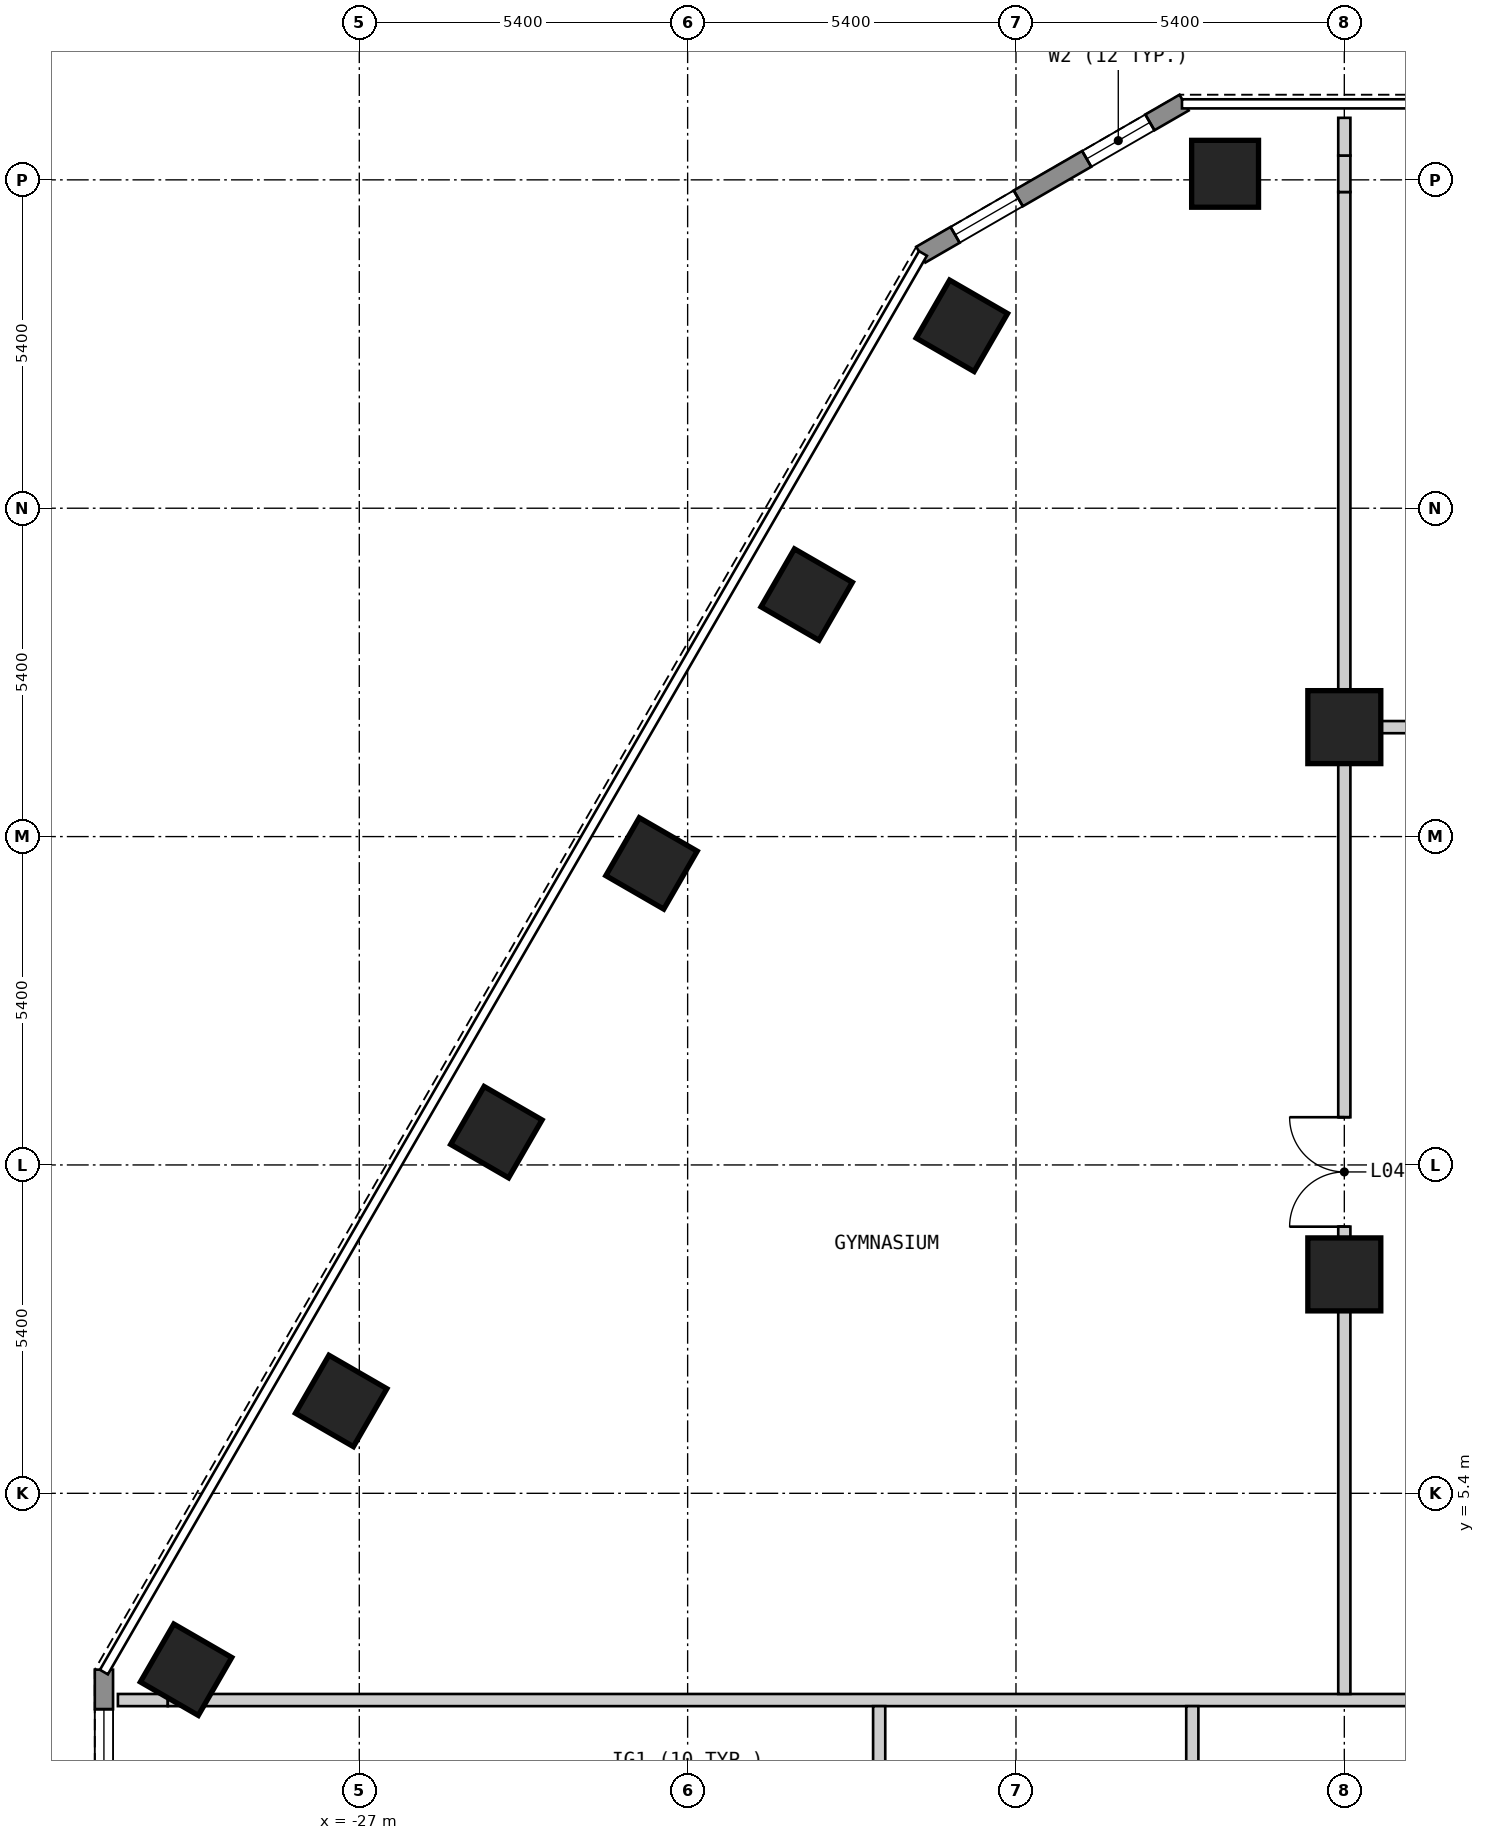
"""IFC4 building model, lengths in metres.
Left out: names, types, materials, properties, quantities, classifications, styles, units other than length and angle.
Written with IfcOpenShell. Run it as: python <this file> out.ifc"""

import sys

from ifc_helpers import new_model, si_unit, direction, frame, frame_2d, origin, origin_2d, place, context, subcontext, project, spatial, polyline, rectangle, outline, extrude, element, fill, save


model = new_model("IFC4")
c1 = context("Model", 3, precision=1e-05, world=origin(), true_north=direction((0.0, 1.0)))
c2 = subcontext(c1, "Body", "Model", "MODEL_VIEW")
j1 = project(units=[si_unit("LENGTHUNIT", "METRE"), si_unit("PLANEANGLEUNIT", "RADIAN")], contexts=[c1])
p1 = place(None, origin())
s1 = spatial("IfcSite", under=j1, at=p1, CompositionType="ELEMENT")
p2 = place(p1, origin())
s2 = spatial("IfcBuilding", under=s1, at=p2, CompositionType="ELEMENT")
p3 = place(p2, frame((0.0, 0.0, 16.2)))
s3 = spatial("IfcBuildingStorey", under=s2, at=p3, CompositionType="ELEMENT", Elevation=16.2)
for number, where, z_axis, x_axis in (
    (1, (-12.761, 27.1, 0.0), (0.0, 0.0, 1.0), (-1.0, 0.0, 0.0)),
    (2, (-17.09, 24.6, 0.0), (0.0, 0.0, 1.0), (-0.5, -0.866, 0.0)),
    (3, (-19.642, 20.18, 0.0), (0.0, 0.0, 1.0), (-0.5, -0.866, 0.0)),
    (4, (-22.194, 15.759, 0.0), (0.0, 0.0, 1.0), (-0.5, -0.866, 0.0)),
    (5, (-24.746, 11.339, 0.0), (0.0, 0.0, 1.0), (-0.5, -0.866, 0.0)),
    (6, (-27.298, 6.919, 0.0), (0.0, 0.0, 1.0), (-0.5, -0.866, 0.0)),
    (7, (-29.849, 2.499, 0.0), (0.0, 0.0, 1.0), (-0.5, -0.866, 0.0)),
):
    element("IfcColumn", number, at=place(p3, frame(where, z_axis=z_axis, x_axis=x_axis)), inside=s3, PredefinedType="COLUMN", context=c2, shape_type="SweptSolid", body=[
        extrude(rectangle(XDim=1.1, YDim=1.1, at=origin_2d()), origin(), (0.0, 0.0, 1.0), 3.6),
    ])
for number, where, z_axis, x_axis in (
    (8, (-10.8, 9.0, 0.0), (0.0, 0.0, 1.0), (1.0, 0.0, 0.0)),
    (9, (-10.8, 18.0, 0.0), (0.0, 0.0, 1.0), (1.0, 0.0, 0.0)),
):
    element("IfcColumn", number, at=place(p3, frame(where, z_axis=z_axis, x_axis=x_axis)), inside=s3, PredefinedType="COLUMN", context=c2, shape_type="SweptSolid", body=[
        extrude(rectangle(XDim=1.2, YDim=1.2, at=origin_2d()), origin(), (0.0, 0.0, 1.0), 3.6),
    ])
p4 = place(p3, frame((-13.435, 28.27, 0.0), z_axis=(0.0, 0.0, 1.0), x_axis=(-0.866010750942, -0.50002537861, 0.0)))
e10 = element("IfcWall", 10, at=p4, inside=s3, PredefinedType="SOLIDWALL", context=c2, shape_type="SweptSolid", body=[
    extrude(outline(polyline([(0.0, -0.15), (5.0, -0.15), (4.919, 0.15), (0.08, 0.15), (0.0, -0.15)])), origin(), (0.0, 0.0, 1.0), 3.25),
])
p5 = place(p4, frame((0.65, 0.0, 0.15)))
e11 = element("IfcOpeningElement", 11, at=p5, cuts=e10, PredefinedType="OPENING", context=c2, shape_type="SweptSolid", body=[
    extrude(rectangle(XDim=1.2, YDim=2.1, at=frame_2d((0.6, 1.05))), frame((0.0, 0.16, 0.0), z_axis=(0.0, -1.0, 0.0), x_axis=(1.0, 0.0, 0.0)), (0.0, 0.0, 1.0), 0.32),
])
p6 = place(p4, frame((3.149, 0.0, 0.15)))
e12 = element("IfcOpeningElement", 12, at=p6, cuts=e10, PredefinedType="OPENING", context=c2, shape_type="SweptSolid", body=[
    extrude(rectangle(XDim=1.2, YDim=2.1, at=frame_2d((0.6, 1.05))), frame((0.0, 0.16, 0.0), z_axis=(0.0, -1.0, 0.0), x_axis=(1.0, 0.0, 0.0)), (0.0, 0.0, 1.0), 0.32),
])
p7 = place(p3, frame((-31.2, 2.5, 0.0), z_axis=(0.0, 0.0, 1.0), x_axis=(0.0, -1.0, 0.0)))
e13 = element("IfcWall", 13, at=p7, inside=s3, PredefinedType="SOLIDWALL", context=c2, shape_type="SweptSolid", body=[
    extrude(outline(polyline([(0.0, -0.15), (5.0, -0.15), (4.92, 0.15), (0.08, 0.15), (0.0, -0.15)])), origin(), (0.0, 0.0, 1.0), 3.25),
])
p8 = place(p7, frame((0.65, 0.0, 0.15)))
e14 = element("IfcOpeningElement", 14, at=p8, cuts=e13, PredefinedType="OPENING", context=c2, shape_type="SweptSolid", body=[
    extrude(rectangle(XDim=1.2, YDim=2.1, at=frame_2d((0.6, 1.05))), frame((0.0, 0.16, 0.0), z_axis=(0.0, -1.0, 0.0), x_axis=(1.0, 0.0, 0.0)), (0.0, 0.0, 1.0), 0.32),
])
p9 = place(p7, frame((3.15, 0.0, 0.15)))
e15 = element("IfcOpeningElement", 15, at=p9, cuts=e13, PredefinedType="OPENING", context=c2, shape_type="SweptSolid", body=[
    extrude(rectangle(XDim=1.2, YDim=2.1, at=frame_2d((0.6, 1.05))), frame((0.0, 0.16, 0.0), z_axis=(0.0, -1.0, 0.0), x_axis=(1.0, 0.0, 0.0)), (0.0, 0.0, 1.0), 0.32),
])
p10 = place(p3, frame((-30.97, 2.0, 0.0), z_axis=(0.0, 0.0, 1.0), x_axis=(1.0, 0.0, 0.0)))
e16 = element("IfcWall", 16, at=p10, inside=s3, PredefinedType="PARTITIONING", context=c2, shape_type="SweptSolid", body=[
    extrude(rectangle(XDim=0.821, YDim=0.2, at=frame_2d((0.411, 0.0))), origin(), (0.0, 0.0, 1.0), 3.25),
])
p11 = place(p3, frame((-30.149, 2.0, 0.0), z_axis=(0.0, 0.0, 1.0), x_axis=(1.0, 0.0, 0.0)))
e17 = element("IfcWall", 17, at=p11, inside=s3, PredefinedType="PARTITIONING", context=c2, shape_type="SweptSolid", body=[
    extrude(rectangle(XDim=0.6, YDim=0.2, at=frame_2d((0.3, 0.0))), origin(), (0.0, 0.0, 1.0), 2.52),
])
p12 = place(p3, frame((-29.549, 2.0, 0.0), z_axis=(0.0, 0.0, 1.0), x_axis=(1.0, 0.0, 0.0)))
e18 = element("IfcWall", 18, at=p12, inside=s3, PredefinedType="PARTITIONING", context=c2, shape_type="SweptSolid", body=[
    extrude(rectangle(XDim=59.097, YDim=0.2, at=frame_2d((29.549, 0.0))), origin(), (0.0, 0.0, 1.0), 3.25),
])
p13 = place(p12, frame((21.517, 0.0, 0.0)))
e19 = element("IfcOpeningElement", 19, at=p13, cuts=e18, PredefinedType="OPENING", context=c2, shape_type="SweptSolid", body=[
    extrude(rectangle(XDim=1.8, YDim=2.1, at=frame_2d((0.9, 1.05))), frame((0.0, 0.11, 0.0), z_axis=(0.0, -1.0, 0.0), x_axis=(1.0, 0.0, 0.0)), (0.0, 0.0, 1.0), 0.22),
])
p14 = place(p12, frame((35.781, 0.0, 0.0)))
e20 = element("IfcOpeningElement", 20, at=p14, cuts=e18, PredefinedType="OPENING", context=c2, shape_type="SweptSolid", body=[
    extrude(rectangle(XDim=1.8, YDim=2.1, at=frame_2d((0.9, 1.05))), frame((0.0, 0.11, 0.0), z_axis=(0.0, -1.0, 0.0), x_axis=(1.0, 0.0, 0.0)), (0.0, 0.0, 1.0), 0.22),
])
p15 = place(p3, frame((-10.7, 18.0, 0.0), z_axis=(0.0, 0.0, 1.0), x_axis=(1.0, 0.0, 0.0)))
e21 = element("IfcWall", 21, at=p15, inside=s3, PredefinedType="PARTITIONING", context=c2, shape_type="SweptSolid", body=[
    extrude(rectangle(XDim=21.4, YDim=0.2, at=frame_2d((10.7, 0.0))), origin(), (0.0, 0.0, 1.0), 3.25),
])
p16 = place(p15, frame((7.87, 0.0, 0.0)))
e22 = element("IfcOpeningElement", 22, at=p16, cuts=e21, PredefinedType="OPENING", context=c2, shape_type="SweptSolid", body=[
    extrude(rectangle(XDim=1.8, YDim=2.1, at=frame_2d((0.9, 1.05))), frame((0.0, 0.11, 0.0), z_axis=(0.0, -1.0, 0.0), x_axis=(1.0, 0.0, 0.0)), (0.0, 0.0, 1.0), 0.22),
])
p17 = place(p3, frame((-18.45, -21.471, 0.0), z_axis=(0.0, 0.0, 1.0), x_axis=(0.0, 1.0, 0.0)))
e23 = element("IfcWall", 23, at=p17, inside=s3, PredefinedType="PARTITIONING", context=c2, shape_type="SweptSolid", body=[
    extrude(rectangle(XDim=23.371, YDim=0.2, at=frame_2d((11.686, 0.0))), origin(), (0.0, 0.0, 1.0), 3.25),
])
p18 = place(p17, frame((5.373, 0.0, 0.0)))
e24 = element("IfcOpeningElement", 24, at=p18, cuts=e23, PredefinedType="OPENING", context=c2, shape_type="SweptSolid", body=[
    extrude(rectangle(XDim=1.0, YDim=2.1, at=frame_2d((0.5, 1.05))), frame((0.0, 0.11, 0.0), z_axis=(0.0, -1.0, 0.0), x_axis=(1.0, 0.0, 0.0)), (0.0, 0.0, 1.0), 0.22),
])
p19 = place(p17, frame((16.969, 0.0, 0.0)))
e25 = element("IfcOpeningElement", 25, at=p19, cuts=e23, PredefinedType="OPENING", context=c2, shape_type="SweptSolid", body=[
    extrude(rectangle(XDim=1.0, YDim=2.1, at=frame_2d((0.5, 1.05))), frame((0.0, 0.11, 0.0), z_axis=(0.0, -1.0, 0.0), x_axis=(1.0, 0.0, 0.0)), (0.0, 0.0, 1.0), 0.22),
])
p20 = place(p3, frame((-13.3, -4.88, 0.0), z_axis=(0.0, 0.0, 1.0), x_axis=(0.0, 1.0, 0.0)))
e26 = element("IfcWall", 26, at=p20, inside=s3, PredefinedType="PARTITIONING", context=c2, shape_type="SweptSolid", body=[
    extrude(rectangle(XDim=6.78, YDim=0.2, at=frame_2d((3.39, 0.0))), origin(), (0.0, 0.0, 1.0), 3.25),
])
p21 = place(p3, frame((-10.8, 2.1, 0.0), z_axis=(0.0, 0.0, 1.0), x_axis=(0.0, 1.0, 0.0)))
e27 = element("IfcWall", 27, at=p21, inside=s3, PredefinedType="PARTITIONING", context=c2, shape_type="SweptSolid", body=[
    extrude(rectangle(XDim=24.7, YDim=0.2, at=frame_2d((12.35, 0.0))), origin(), (0.0, 0.0, 1.0), 3.25),
])
p22 = place(p21, frame((7.685, 0.0, 0.0)))
e28 = element("IfcOpeningElement", 28, at=p22, cuts=e27, PredefinedType="OPENING", context=c2, shape_type="SweptSolid", body=[
    extrude(rectangle(XDim=1.8, YDim=2.1, at=frame_2d((0.9, 1.05))), frame((0.0, 0.11, 0.0), z_axis=(0.0, -1.0, 0.0), x_axis=(1.0, 0.0, 0.0)), (0.0, 0.0, 1.0), 0.22),
])
p23 = place(p3, frame((-10.8, 26.8, 0.0), z_axis=(0.0, 0.0, 1.0), x_axis=(0.0, 1.0, 0.0)))
e29 = element("IfcWall", 29, at=p23, inside=s3, PredefinedType="PARTITIONING", context=c2, shape_type="SweptSolid", body=[
    extrude(rectangle(XDim=0.6, YDim=0.2, at=frame_2d((0.3, 0.0))), origin(), (0.0, 0.0, 1.0), 2.52),
])
p24 = place(p3, frame((-10.8, 27.4, 0.0), z_axis=(0.0, 0.0, 1.0), x_axis=(0.0, 1.0, 0.0)))
e30 = element("IfcWall", 30, at=p24, inside=s3, PredefinedType="PARTITIONING", context=c2, shape_type="SweptSolid", body=[
    extrude(rectangle(XDim=0.62, YDim=0.2, at=frame_2d((0.31, 0.0))), origin(), (0.0, 0.0, 1.0), 3.25),
])
p25 = place(p5, origin())
e31 = element("IfcWindow", 31, at=p25, inside=s3, PartitioningType="SINGLE_PANEL", PredefinedType="WINDOW", context=c2, shape_type="SweptSolid", body=[
    extrude(rectangle(XDim=1.2, YDim=2.1, at=frame_2d((0.6, 1.05))), frame((0.0, 0.03, 0.0), z_axis=(0.0, -1.0, 0.0), x_axis=(1.0, 0.0, 0.0)), (0.0, 0.0, 1.0), 0.06),
])
fill(e11, e31)
p26 = place(p6, origin())
e32 = element("IfcWindow", 32, at=p26, inside=s3, PartitioningType="SINGLE_PANEL", PredefinedType="WINDOW", context=c2, shape_type="SweptSolid", body=[
    extrude(rectangle(XDim=1.2, YDim=2.1, at=frame_2d((0.6, 1.05))), frame((0.0, 0.03, 0.0), z_axis=(0.0, -1.0, 0.0), x_axis=(1.0, 0.0, 0.0)), (0.0, 0.0, 1.0), 0.06),
])
fill(e12, e32)
p27 = place(p8, origin())
e33 = element("IfcWindow", 33, at=p27, inside=s3, PartitioningType="SINGLE_PANEL", PredefinedType="WINDOW", context=c2, shape_type="SweptSolid", body=[
    extrude(rectangle(XDim=1.2, YDim=2.1, at=frame_2d((0.6, 1.05))), frame((0.0, 0.03, 0.0), z_axis=(0.0, -1.0, 0.0), x_axis=(1.0, 0.0, 0.0)), (0.0, 0.0, 1.0), 0.06),
])
fill(e14, e33)
p28 = place(p22, origin())
e34 = element("IfcDoor", 34, at=p28, inside=s3, OperationType="DOUBLE_DOOR_SINGLE_SWING", PredefinedType="DOOR", context=c2, shape_type="SweptSolid", body=[
    extrude(rectangle(XDim=1.8, YDim=2.1, at=frame_2d((0.9, 1.05))), frame((0.0, 0.025, 0.0), z_axis=(0.0, -1.0, 0.0), x_axis=(1.0, 0.0, 0.0)), (0.0, 0.0, 1.0), 0.05),
])
fill(e28, e34)
save(model, sys.argv[1])
